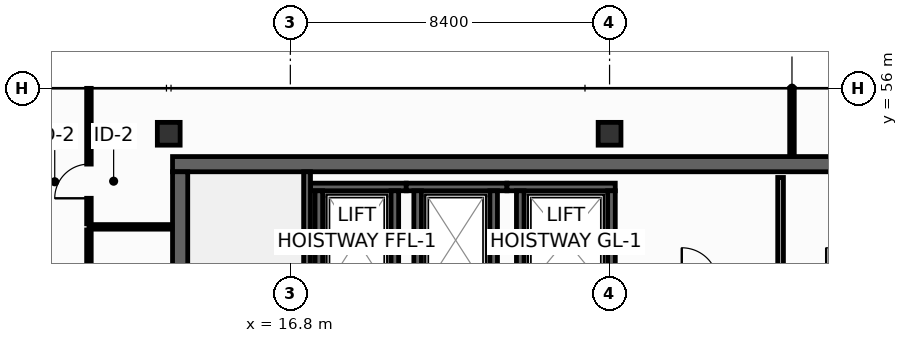
"""IFC4 building model, lengths in metres.
Left out: names, types, materials, properties, quantities, classifications, styles, units other than length and angle.
Written with IfcOpenShell. Run it as: python <this file> out.ifc"""

import sys

from ifc_helpers import new_model, si_unit, direction, frame, frame_2d, origin, origin_2d, place, context, subcontext, project, spatial, rectangle, hollow_rectangle, extrude, element, fill, save


model = new_model("IFC4")
c1 = context("Model", 3, precision=1e-05, world=origin(), true_north=direction((0.0, 1.0)))
c2 = subcontext(c1, "Body", "Model", "MODEL_VIEW")
j1 = project(units=[si_unit("LENGTHUNIT", "METRE"), si_unit("PLANEANGLEUNIT", "RADIAN")], contexts=[c1])
p1 = place(None, origin())
s1 = spatial("IfcSite", under=j1, at=p1, CompositionType="ELEMENT")
p2 = place(p1, origin())
s2 = spatial("IfcBuilding", under=s1, at=p2, CompositionType="ELEMENT")
p3 = place(p2, frame((0.0, 0.0, 276.2)))
s3 = spatial("IfcBuildingStorey", under=s2, at=p3, CompositionType="ELEMENT", Elevation=276.2)
p4 = place(p3, frame((13.7, 54.0, 0.0), z_axis=(0.0, 0.0, 1.0), x_axis=(1.0, 0.0, 0.0)))
e1 = element("IfcWall", 1, at=p4, inside=s3, PredefinedType="SHEAR", context=c2, shape_type="SweptSolid", body=[
    extrude(rectangle(XDim=32.5, YDim=0.4, at=frame_2d((16.25, 0.0))), origin(), (0.0, 0.0, 1.0), 3.55),
])
p5 = place(p3, frame((13.9, 43.4, 0.0), z_axis=(0.0, 0.0, 1.0), x_axis=(0.0, 1.0, 0.0)))
e2 = element("IfcWall", 2, at=p5, inside=s3, PredefinedType="SHEAR", context=c2, shape_type="SweptSolid", body=[
    extrude(rectangle(XDim=10.4, YDim=0.4, at=frame_2d((5.2, 0.0))), origin(), (0.0, 0.0, 1.0), 3.55),
])
for number, where, z_axis, x_axis in (
    (3, (13.6, 54.8, 0.0), (0.0, 0.0, 1.0), (1.0, 0.0, 0.0)),
    (4, (25.2, 54.8, 0.0), (0.0, 0.0, 1.0), (1.0, 0.0, 0.0)),
):
    element("IfcColumn", number, at=place(p3, frame(where, z_axis=z_axis, x_axis=x_axis)), inside=s3, PredefinedType="COLUMN", context=c2, shape_type="SweptSolid", body=[
        extrude(hollow_rectangle(XDim=0.6, YDim=0.6, WallThickness=0.028, at=origin_2d()), origin(), (0.0, 0.0, 1.0), 3.8),
    ])
p6 = place(p3, frame((17.33, 53.4, 0.0), z_axis=(0.0, 0.0, 1.0), x_axis=(1.0, 0.0, 0.0)))
e5 = element("IfcWall", 5, at=p6, inside=s3, PredefinedType="SHEAR", context=c2, shape_type="SweptSolid", body=[
    extrude(rectangle(XDim=2.52, YDim=0.2, at=frame_2d((1.26, 0.0))), origin(), (0.0, 0.0, 1.0), 3.55),
])
for number, where, z_axis, x_axis in (
    (6, (17.55, 50.7, 0.0), (0.0, 0.0, 1.0), (0.0, 1.0, 0.0)),
    (7, (19.55, 50.7, 0.0), (0.0, 0.0, 1.0), (0.0, 1.0, 0.0)),
):
    element("IfcWall", number, at=place(p3, frame(where, z_axis=z_axis, x_axis=x_axis)), inside=s3, PredefinedType="SHEAR", context=c2, shape_type="SweptSolid", body=[
        extrude(rectangle(XDim=2.6, YDim=0.2, at=frame_2d((1.3, 0.0))), origin(), (0.0, 0.0, 1.0), 3.55),
    ])
p7 = place(p3, frame((19.85, 53.4, 0.0), z_axis=(0.0, 0.0, 1.0), x_axis=(1.0, 0.0, 0.0)))
e8 = element("IfcWall", 8, at=p7, inside=s3, PredefinedType="SHEAR", context=c2, shape_type="SweptSolid", body=[
    extrude(rectangle(XDim=2.65, YDim=0.2, at=frame_2d((1.325, 0.0))), origin(), (0.0, 0.0, 1.0), 3.55),
])
for number, where, z_axis, x_axis in (
    (9, (20.15, 50.7, 0.0), (0.0, 0.0, 1.0), (0.0, 1.0, 0.0)),
    (10, (22.15, 50.7, 0.0), (0.0, 0.0, 1.0), (0.0, 1.0, 0.0)),
):
    element("IfcWall", number, at=place(p3, frame(where, z_axis=z_axis, x_axis=x_axis)), inside=s3, PredefinedType="SHEAR", context=c2, shape_type="SweptSolid", body=[
        extrude(rectangle(XDim=2.6, YDim=0.2, at=frame_2d((1.3, 0.0))), origin(), (0.0, 0.0, 1.0), 3.55),
    ])
p8 = place(p3, frame((22.5, 53.4, 0.0), z_axis=(0.0, 0.0, 1.0), x_axis=(1.0, 0.0, 0.0)))
e11 = element("IfcWall", 11, at=p8, inside=s3, PredefinedType="SHEAR", context=c2, shape_type="SweptSolid", body=[
    extrude(rectangle(XDim=2.85, YDim=0.2, at=frame_2d((1.425, 0.0))), origin(), (0.0, 0.0, 1.0), 3.55),
])
for number, where, z_axis, x_axis in (
    (12, (22.85, 50.7, 0.0), (0.0, 0.0, 1.0), (0.0, 1.0, 0.0)),
    (13, (25.25, 50.7, 0.0), (0.0, 0.0, 1.0), (0.0, 1.0, 0.0)),
):
    element("IfcWall", number, at=place(p3, frame(where, z_axis=z_axis, x_axis=x_axis)), inside=s3, PredefinedType="SHEAR", context=c2, shape_type="SweptSolid", body=[
        extrude(rectangle(XDim=2.6, YDim=0.2, at=frame_2d((1.3, 0.0))), origin(), (0.0, 0.0, 1.0), 3.55),
    ])
p9 = place(p3, frame((17.24, 43.4, 0.0), z_axis=(0.0, 0.0, 1.0), x_axis=(0.0, 1.0, 0.0)))
e14 = element("IfcWall", 14, at=p9, inside=s3, PredefinedType="SHEAR", context=c2, shape_type="SweptSolid", body=[
    extrude(rectangle(XDim=10.4, YDim=0.18, at=frame_2d((5.2, 0.0))), origin(), (0.0, 0.0, 1.0), 3.55),
])
p10 = place(p9, frame((0.16, 0.0, 0.0)))
e15 = element("IfcOpeningElement", 15, at=p10, cuts=e14, PredefinedType="OPENING", context=c2, shape_type="SweptSolid", body=[
    extrude(rectangle(XDim=1.0, YDim=2.15, at=frame_2d((0.5, 1.075))), frame((0.0, 0.1, 0.0), z_axis=(0.0, -1.0, 0.0), x_axis=(1.0, 0.0, 0.0)), (0.0, 0.0, 1.0), 0.2),
])
p11 = place(p3, frame((29.7, 50.95, 0.0), z_axis=(0.0, 0.0, 1.0), x_axis=(0.0, 1.0, 0.0)))
e16 = element("IfcWall", 16, at=p11, inside=s3, PredefinedType="PARTITIONING", context=c2, shape_type="SweptSolid", body=[
    extrude(rectangle(XDim=2.7, YDim=0.15, at=frame_2d((1.35, 0.0))), origin(), (0.0, 0.0, 1.0), 3.55),
])
p12 = place(p3, frame((11.5, 52.35, 0.0), z_axis=(0.0, 0.0, 1.0), x_axis=(1.0, 0.0, 0.0)))
e17 = element("IfcWall", 17, at=p12, inside=s3, PredefinedType="PARTITIONING", context=c2, shape_type="SweptSolid", body=[
    extrude(rectangle(XDim=2.18, YDim=0.12, at=frame_2d((1.09, 0.0))), origin(), (0.0, 0.0, 1.0), 3.55),
])
p13 = place(p3, frame((30.0, 54.22, 0.0), z_axis=(0.0, 0.0, 1.0), x_axis=(0.0, 1.0, 0.0)))
e18 = element("IfcWall", 18, at=p13, inside=s3, PredefinedType="PARTITIONING", context=c2, shape_type="SweptSolid", body=[
    extrude(rectangle(XDim=1.775, YDim=0.12, at=frame_2d((0.888, 0.0))), origin(), (0.0, 0.0, 1.0), 2.935),
])
p14 = place(p3, frame((11.5, 52.43, 0.0), z_axis=(0.0, 0.0, 1.0), x_axis=(0.0, 1.0, 0.0)))
e19 = element("IfcWall", 19, at=p14, inside=s3, PredefinedType="PARTITIONING", context=c2, shape_type="SweptSolid", body=[
    extrude(rectangle(XDim=3.565, YDim=0.12, at=frame_2d((1.783, 0.0))), origin(), (0.0, 0.0, 1.0), 2.935),
])
p15 = place(p14, frame((0.672, 0.0, 0.0)))
e20 = element("IfcOpeningElement", 20, at=p15, cuts=e19, PredefinedType="OPENING", context=c2, shape_type="SweptSolid", body=[
    extrude(rectangle(XDim=0.9, YDim=2.1, at=frame_2d((0.45, 1.05))), frame((0.0, 0.07, 0.0), z_axis=(0.0, -1.0, 0.0), x_axis=(1.0, 0.0, 0.0)), (0.0, 0.0, 1.0), 0.14),
])
p16 = place(p3, frame((11.5, 46.48, 0.0), z_axis=(0.0, 0.0, 1.0), x_axis=(0.0, 1.0, 0.0)))
e21 = element("IfcWall", 21, at=p16, inside=s3, PredefinedType="PARTITIONING", context=c2, shape_type="SweptSolid", body=[
    extrude(rectangle(XDim=5.79, YDim=0.12, at=frame_2d((2.895, 0.0))), origin(), (0.0, 0.0, 1.0), 3.55),
])
p17 = place(p16, frame((2.445, 0.0, 0.0)))
e22 = element("IfcOpeningElement", 22, at=p17, cuts=e21, PredefinedType="OPENING", context=c2, shape_type="SweptSolid", body=[
    extrude(rectangle(XDim=0.9, YDim=2.1, at=frame_2d((0.45, 1.05))), frame((0.0, 0.07, 0.0), z_axis=(0.0, -1.0, 0.0), x_axis=(1.0, 0.0, 0.0)), (0.0, 0.0, 1.0), 0.14),
])
p18 = place(p15, origin())
e23 = element("IfcDoor", 23, at=p18, inside=s3, OperationType="SINGLE_SWING_LEFT", PredefinedType="DOOR", context=c2, shape_type="SweptSolid", body=[
    extrude(rectangle(XDim=0.9, YDim=2.1, at=frame_2d((0.45, 1.05))), frame((0.0, 0.025, 0.0), z_axis=(0.0, -1.0, 0.0), x_axis=(1.0, 0.0, 0.0)), (0.0, 0.0, 1.0), 0.05),
])
fill(e20, e23)
save(model, sys.argv[1])
